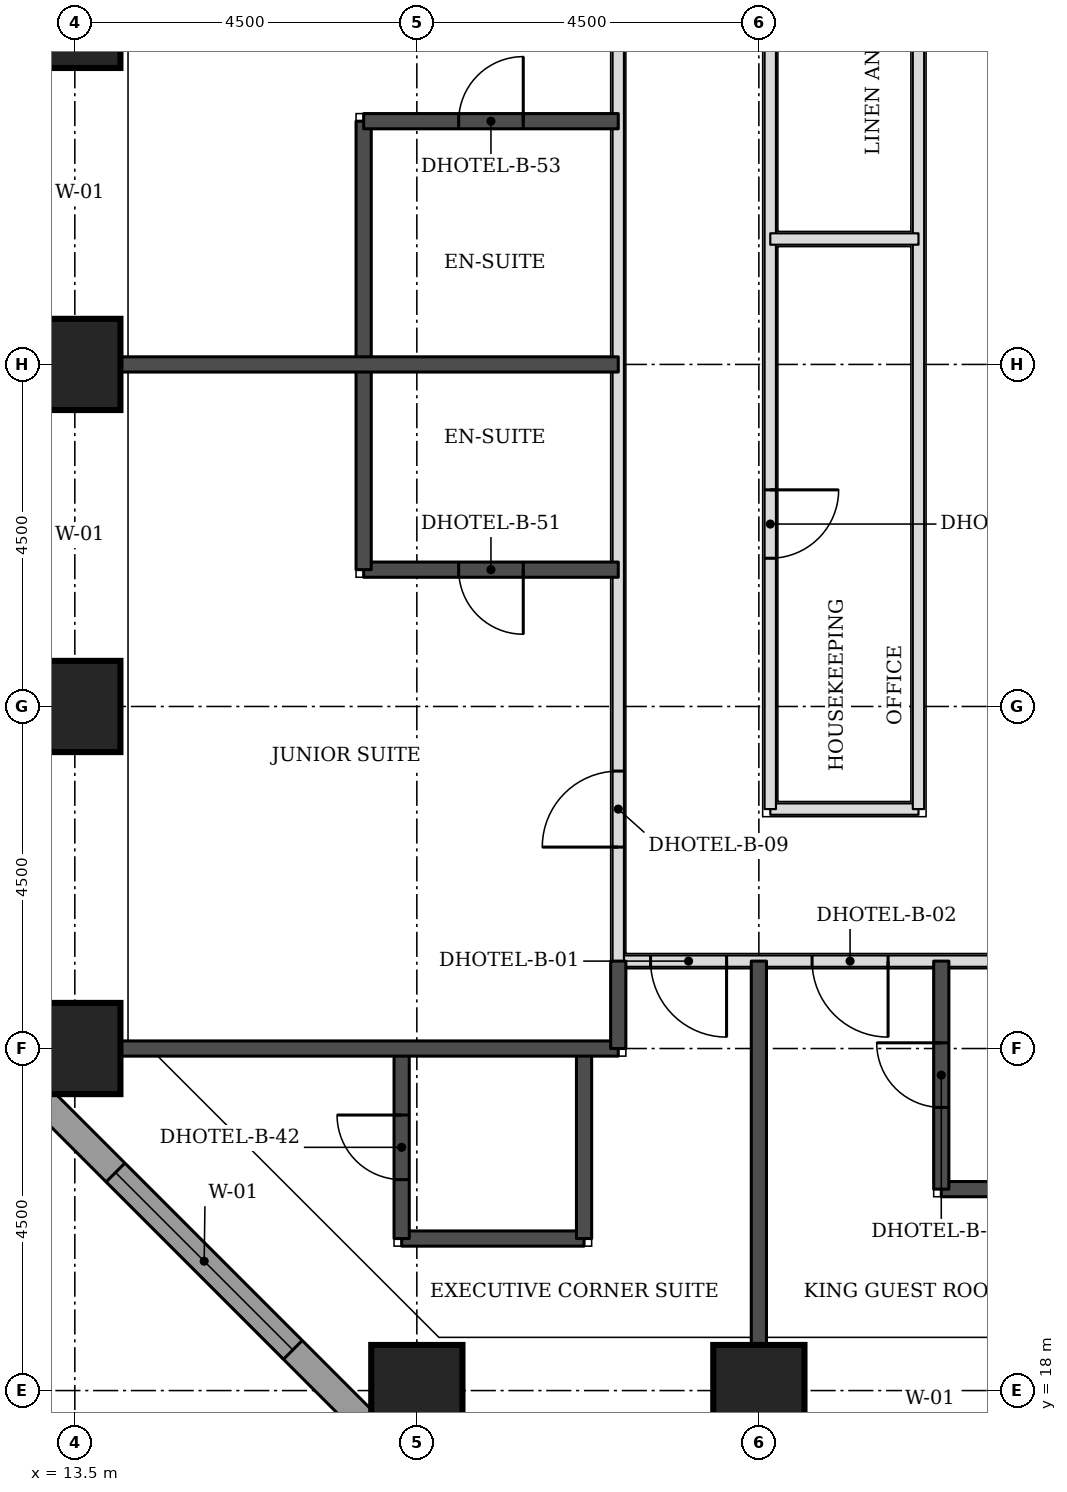
"""IFC4 building model, lengths in metres.
Left out: names, types, materials, properties, quantities, classifications, styles, units other than length and angle.
Written with IfcOpenShell. Run it as: python <this file> out.ifc"""

import sys

from ifc_helpers import new_model, si_unit, direction, frame, frame_2d, origin, origin_2d, place, context, subcontext, project, spatial, rectangle, extrude, element, fill, save


model = new_model("IFC4")
c1 = context("Model", 3, precision=1e-05, world=origin(), true_north=direction((0.0, 1.0)))
c2 = subcontext(c1, "Body", "Model", "MODEL_VIEW")
j1 = project(units=[si_unit("LENGTHUNIT", "METRE"), si_unit("PLANEANGLEUNIT", "RADIAN")], contexts=[c1])
p1 = place(None, origin())
s1 = spatial("IfcSite", under=j1, at=p1, CompositionType="ELEMENT")
p2 = place(p1, origin())
s2 = spatial("IfcBuilding", under=s1, at=p2, CompositionType="ELEMENT")
p3 = place(p2, frame((0.0, 0.0, 29.7)))
s3 = spatial("IfcBuildingStorey", under=s2, at=p3, CompositionType="ELEMENT", Elevation=29.7)
for number, where, z_axis, x_axis in (
    (1, (18.0, 18.0, 0.0), (0.0, 0.0, 1.0), (1.0, 0.0, 0.0)),
    (2, (22.5, 18.0, 0.0), (0.0, 0.0, 1.0), (1.0, 0.0, 0.0)),
    (3, (13.5, 22.5, 0.0), (0.0, 0.0, 1.0), (1.0, 0.0, 0.0)),
    (4, (13.5, 27.0, 0.0), (0.0, 0.0, 1.0), (1.0, 0.0, 0.0)),
    (5, (13.5, 31.5, 0.0), (0.0, 0.0, 1.0), (1.0, 0.0, 0.0)),
    (6, (13.5, 36.0, 0.0), (0.0, 0.0, 1.0), (1.0, 0.0, 0.0)),
):
    element("IfcColumn", number, at=place(p3, frame(where, z_axis=z_axis, x_axis=x_axis)), inside=s3, PredefinedType="COLUMN", context=c2, shape_type="SweptSolid", body=[
        extrude(rectangle(XDim=1.2, YDim=1.2, at=origin_2d()), origin(), (0.0, 0.0, 1.0), 3.3),
    ])
p4 = place(p3, frame((12.674, 22.23, 0.0), z_axis=(0.0, 0.0, 1.0), x_axis=(0.707106781187, -0.707106781187, 0.0)))
e7 = element("IfcWall", 7, at=p4, inside=s3, PredefinedType="STANDARD", context=c2, shape_type="SweptSolid", body=[
    extrude(rectangle(XDim=7.151, YDim=0.35, at=frame_2d((3.576, 0.0))), origin(), (0.0, 0.0, 1.0), 3.055),
])
p5 = place(p4, frame((1.926, 0.0, 0.8)))
e8 = element("IfcOpeningElement", 8, at=p5, cuts=e7, PredefinedType="OPENING", context=c2, shape_type="SweptSolid", body=[
    extrude(rectangle(XDim=3.3, YDim=1.5, at=frame_2d((1.65, 0.75))), frame((0.0, 0.185, 0.0), z_axis=(0.0, -1.0, 0.0), x_axis=(1.0, 0.0, 0.0)), (0.0, 0.0, 1.0), 0.37),
])
p6 = place(p3, frame((20.65, 23.65, 0.0), z_axis=(0.0, 0.0, 1.0), x_axis=(1.0, 0.0, 0.0)))
e9 = element("IfcWall", 9, at=p6, inside=s3, PredefinedType="PARTITIONING", context=c2, shape_type="SweptSolid", body=[
    extrude(rectangle(XDim=32.2, YDim=0.15, at=frame_2d((16.1, 0.0))), origin(), (0.0, 0.0, 1.0), 3.08),
])
p7 = place(p6, frame((2.55, 0.0, 0.0)))
e10 = element("IfcOpeningElement", 10, at=p7, cuts=e9, PredefinedType="OPENING", context=c2, shape_type="SweptSolid", body=[
    extrude(rectangle(XDim=1.0, YDim=2.1, at=frame_2d((0.5, 1.05))), frame((0.0, 0.085, 0.0), z_axis=(0.0, -1.0, 0.0), x_axis=(1.0, 0.0, 0.0)), (0.0, 0.0, 1.0), 0.17),
])
p8 = place(p6, frame((9.4, 0.0, 0.0)))
e11 = element("IfcOpeningElement", 11, at=p8, cuts=e9, PredefinedType="OPENING", context=c2, shape_type="SweptSolid", body=[
    extrude(rectangle(XDim=1.0, YDim=2.1, at=frame_2d((0.5, 1.05))), frame((0.0, 0.085, 0.0), z_axis=(0.0, -1.0, 0.0), x_axis=(1.0, 0.0, 0.0)), (0.0, 0.0, 1.0), 0.17),
])
p9 = place(p6, frame((11.55, 0.0, 0.0)))
e12 = element("IfcOpeningElement", 12, at=p9, cuts=e9, PredefinedType="OPENING", context=c2, shape_type="SweptSolid", body=[
    extrude(rectangle(XDim=1.0, YDim=2.1, at=frame_2d((0.5, 1.05))), frame((0.0, 0.085, 0.0), z_axis=(0.0, -1.0, 0.0), x_axis=(1.0, 0.0, 0.0)), (0.0, 0.0, 1.0), 0.17),
])
p10 = place(p6, frame((18.4, 0.0, 0.0)))
e13 = element("IfcOpeningElement", 13, at=p10, cuts=e9, PredefinedType="OPENING", context=c2, shape_type="SweptSolid", body=[
    extrude(rectangle(XDim=1.0, YDim=2.1, at=frame_2d((0.5, 1.05))), frame((0.0, 0.085, 0.0), z_axis=(0.0, -1.0, 0.0), x_axis=(1.0, 0.0, 0.0)), (0.0, 0.0, 1.0), 0.17),
])
p11 = place(p6, frame((20.55, 0.0, 0.0)))
e14 = element("IfcOpeningElement", 14, at=p11, cuts=e9, PredefinedType="OPENING", context=c2, shape_type="SweptSolid", body=[
    extrude(rectangle(XDim=1.0, YDim=2.1, at=frame_2d((0.5, 1.05))), frame((0.0, 0.085, 0.0), z_axis=(0.0, -1.0, 0.0), x_axis=(1.0, 0.0, 0.0)), (0.0, 0.0, 1.0), 0.17),
])
p12 = place(p6, frame((27.4, 0.0, 0.0)))
e15 = element("IfcOpeningElement", 15, at=p12, cuts=e9, PredefinedType="OPENING", context=c2, shape_type="SweptSolid", body=[
    extrude(rectangle(XDim=1.0, YDim=2.1, at=frame_2d((0.5, 1.05))), frame((0.0, 0.085, 0.0), z_axis=(0.0, -1.0, 0.0), x_axis=(1.0, 0.0, 0.0)), (0.0, 0.0, 1.0), 0.17),
])
p13 = place(p6, frame((0.425, 0.0, 0.0)))
e16 = element("IfcOpeningElement", 16, at=p13, cuts=e9, PredefinedType="OPENING", context=c2, shape_type="SweptSolid", body=[
    extrude(rectangle(XDim=1.0, YDim=2.1, at=frame_2d((0.5, 1.05))), frame((0.0, 0.085, 0.0), z_axis=(0.0, -1.0, 0.0), x_axis=(1.0, 0.0, 0.0)), (0.0, 0.0, 1.0), 0.17),
])
p14 = place(p6, frame((30.025, 0.0, 0.0)))
e17 = element("IfcOpeningElement", 17, at=p14, cuts=e9, PredefinedType="OPENING", context=c2, shape_type="SweptSolid", body=[
    extrude(rectangle(XDim=1.0, YDim=2.1, at=frame_2d((0.5, 1.05))), frame((0.0, 0.085, 0.0), z_axis=(0.0, -1.0, 0.0), x_axis=(1.0, 0.0, 0.0)), (0.0, 0.0, 1.0), 0.17),
])
p15 = place(p3, frame((20.65, 23.65, 0.0), z_axis=(0.0, 0.0, 1.0), x_axis=(0.0, 1.0, 0.0)))
e18 = element("IfcWall", 18, at=p15, inside=s3, PredefinedType="PARTITIONING", context=c2, shape_type="SweptSolid", body=[
    extrude(rectangle(XDim=25.85, YDim=0.15, at=frame_2d((12.925, 0.0))), origin(), (0.0, 0.0, 1.0), 3.08),
])
p16 = place(p15, frame((1.5, 0.0, 0.0)))
e19 = element("IfcOpeningElement", 19, at=p16, cuts=e18, PredefinedType="OPENING", context=c2, shape_type="SweptSolid", body=[
    extrude(rectangle(XDim=1.0, YDim=2.1, at=frame_2d((0.5, 1.05))), frame((0.0, 0.085, 0.0), z_axis=(0.0, -1.0, 0.0), x_axis=(1.0, 0.0, 0.0)), (0.0, 0.0, 1.0), 0.17),
])
p17 = place(p15, frame((13.45, 0.0, 0.0)))
e20 = element("IfcOpeningElement", 20, at=p17, cuts=e18, PredefinedType="OPENING", context=c2, shape_type="SweptSolid", body=[
    extrude(rectangle(XDim=1.0, YDim=2.1, at=frame_2d((0.5, 1.05))), frame((0.0, 0.085, 0.0), z_axis=(0.0, -1.0, 0.0), x_axis=(1.0, 0.0, 0.0)), (0.0, 0.0, 1.0), 0.17),
])
p18 = place(p15, frame((19.5, 0.0, 0.0)))
e21 = element("IfcOpeningElement", 21, at=p18, cuts=e18, PredefinedType="OPENING", context=c2, shape_type="SweptSolid", body=[
    extrude(rectangle(XDim=1.0, YDim=2.1, at=frame_2d((0.5, 1.05))), frame((0.0, 0.085, 0.0), z_axis=(0.0, -1.0, 0.0), x_axis=(1.0, 0.0, 0.0)), (0.0, 0.0, 1.0), 0.17),
])
p19 = place(p3, frame((22.65, 25.65, 0.0), z_axis=(0.0, 0.0, 1.0), x_axis=(1.0, 0.0, 0.0)))
e22 = element("IfcWall", 22, at=p19, inside=s3, PredefinedType="PARTITIONING", context=c2, shape_type="SweptSolid", body=[
    extrude(rectangle(XDim=1.95, YDim=0.15, at=frame_2d((0.975, 0.0))), origin(), (0.0, 0.0, 1.0), 3.08),
])
p20 = place(p3, frame((22.65, 25.65, 0.0), z_axis=(0.0, 0.0, 1.0), x_axis=(0.0, 1.0, 0.0)))
e23 = element("IfcWall", 23, at=p20, inside=s3, PredefinedType="PARTITIONING", context=c2, shape_type="SweptSolid", body=[
    extrude(rectangle(XDim=17.35, YDim=0.15, at=frame_2d((8.675, 0.0))), origin(), (0.0, 0.0, 1.0), 3.08),
])
p21 = place(p20, frame((3.3, 0.0, 0.0)))
e24 = element("IfcOpeningElement", 24, at=p21, cuts=e23, PredefinedType="OPENING", context=c2, shape_type="SweptSolid", body=[
    extrude(rectangle(XDim=0.9, YDim=2.1, at=frame_2d((0.45, 1.05))), frame((0.0, 0.085, 0.0), z_axis=(0.0, -1.0, 0.0), x_axis=(1.0, 0.0, 0.0)), (0.0, 0.0, 1.0), 0.17),
])
p22 = place(p20, frame((10.725, 0.0, 0.0)))
e25 = element("IfcOpeningElement", 25, at=p22, cuts=e23, PredefinedType="OPENING", context=c2, shape_type="SweptSolid", body=[
    extrude(rectangle(XDim=0.9, YDim=2.1, at=frame_2d((0.45, 1.05))), frame((0.0, 0.085, 0.0), z_axis=(0.0, -1.0, 0.0), x_axis=(1.0, 0.0, 0.0)), (0.0, 0.0, 1.0), 0.17),
])
p23 = place(p3, frame((24.6, 25.65, 0.0), z_axis=(0.0, 0.0, 1.0), x_axis=(0.0, 1.0, 0.0)))
e26 = element("IfcWall", 26, at=p23, inside=s3, PredefinedType="PARTITIONING", context=c2, shape_type="SweptSolid", body=[
    extrude(rectangle(XDim=14.85, YDim=0.15, at=frame_2d((7.425, 0.0))), origin(), (0.0, 0.0, 1.0), 3.08),
])
p24 = place(p3, frame((22.5, 18.6, 0.0), z_axis=(0.0, 0.0, 1.0), x_axis=(0.0, 1.0, 0.0)))
e27 = element("IfcWall", 27, at=p24, inside=s3, PredefinedType="SOLIDWALL", context=c2, shape_type="SweptSolid", body=[
    extrude(rectangle(XDim=5.05, YDim=0.2, at=frame_2d((2.525, 0.0))), origin(), (0.0, 0.0, 1.0), 3.08),
])
p25 = place(p3, frame((17.8, 20.0, 0.0), z_axis=(0.0, 0.0, 1.0), x_axis=(1.0, 0.0, 0.0)))
e28 = element("IfcWall", 28, at=p25, inside=s3, PredefinedType="SOLIDWALL", context=c2, shape_type="SweptSolid", body=[
    extrude(rectangle(XDim=2.4, YDim=0.2, at=frame_2d((1.2, 0.0))), origin(), (0.0, 0.0, 1.0), 3.08),
])
p26 = place(p3, frame((17.8, 20.0, 0.0), z_axis=(0.0, 0.0, 1.0), x_axis=(0.0, 1.0, 0.0)))
e29 = element("IfcWall", 29, at=p26, inside=s3, PredefinedType="SOLIDWALL", context=c2, shape_type="SweptSolid", body=[
    extrude(rectangle(XDim=2.5, YDim=0.2, at=frame_2d((1.25, 0.0))), origin(), (0.0, 0.0, 1.0), 3.08),
])
p27 = place(p26, frame((0.775, 0.0, 0.0)))
e30 = element("IfcOpeningElement", 30, at=p27, cuts=e29, PredefinedType="OPENING", context=c2, shape_type="SweptSolid", body=[
    extrude(rectangle(XDim=0.85, YDim=2.1, at=frame_2d((0.425, 1.05))), frame((0.0, 0.11, 0.0), z_axis=(0.0, -1.0, 0.0), x_axis=(1.0, 0.0, 0.0)), (0.0, 0.0, 1.0), 0.22),
])
p28 = place(p3, frame((20.2, 20.0, 0.0), z_axis=(0.0, 0.0, 1.0), x_axis=(0.0, 1.0, 0.0)))
e31 = element("IfcWall", 31, at=p28, inside=s3, PredefinedType="SOLIDWALL", context=c2, shape_type="SweptSolid", body=[
    extrude(rectangle(XDim=2.5, YDim=0.2, at=frame_2d((1.25, 0.0))), origin(), (0.0, 0.0, 1.0), 3.08),
])
p29 = place(p3, frame((24.9, 20.65, 0.0), z_axis=(0.0, 0.0, 1.0), x_axis=(1.0, 0.0, 0.0)))
e32 = element("IfcWall", 32, at=p29, inside=s3, PredefinedType="SOLIDWALL", context=c2, shape_type="SweptSolid", body=[
    extrude(rectangle(XDim=4.7, YDim=0.2, at=frame_2d((2.35, 0.0))), origin(), (0.0, 0.0, 1.0), 3.08),
])
p30 = place(p3, frame((24.9, 20.65, 0.0), z_axis=(0.0, 0.0, 1.0), x_axis=(0.0, 1.0, 0.0)))
e33 = element("IfcWall", 33, at=p30, inside=s3, PredefinedType="SOLIDWALL", context=c2, shape_type="SweptSolid", body=[
    extrude(rectangle(XDim=3.0, YDim=0.2, at=frame_2d((1.5, 0.0))), origin(), (0.0, 0.0, 1.0), 3.08),
])
p31 = place(p30, frame((1.075, 0.0, 0.0)))
e34 = element("IfcOpeningElement", 34, at=p31, cuts=e33, PredefinedType="OPENING", context=c2, shape_type="SweptSolid", body=[
    extrude(rectangle(XDim=0.85, YDim=2.1, at=frame_2d((0.425, 1.05))), frame((0.0, 0.11, 0.0), z_axis=(0.0, -1.0, 0.0), x_axis=(1.0, 0.0, 0.0)), (0.0, 0.0, 1.0), 0.22),
])
p32 = place(p3, frame((14.1, 22.5, 0.0), z_axis=(0.0, 0.0, 1.0), x_axis=(1.0, 0.0, 0.0)))
e35 = element("IfcWall", 35, at=p32, inside=s3, PredefinedType="SOLIDWALL", context=c2, shape_type="SweptSolid", body=[
    extrude(rectangle(XDim=6.55, YDim=0.2, at=frame_2d((3.275, 0.0))), origin(), (0.0, 0.0, 1.0), 3.08),
])
p33 = place(p3, frame((20.65, 22.5, 0.0), z_axis=(0.0, 0.0, 1.0), x_axis=(0.0, 1.0, 0.0)))
e36 = element("IfcWall", 36, at=p33, inside=s3, PredefinedType="SOLIDWALL", context=c2, shape_type="SweptSolid", body=[
    extrude(rectangle(XDim=1.15, YDim=0.2, at=frame_2d((0.575, 0.0))), origin(), (0.0, 0.0, 1.0), 3.08),
])
p34 = place(p3, frame((17.3, 28.8, 0.0), z_axis=(0.0, 0.0, 1.0), x_axis=(1.0, 0.0, 0.0)))
e37 = element("IfcWall", 37, at=p34, inside=s3, PredefinedType="SOLIDWALL", context=c2, shape_type="SweptSolid", body=[
    extrude(rectangle(XDim=3.35, YDim=0.2, at=frame_2d((1.675, 0.0))), origin(), (0.0, 0.0, 1.0), 3.08),
])
p35 = place(p34, frame((1.25, 0.0, 0.0)))
e38 = element("IfcOpeningElement", 38, at=p35, cuts=e37, PredefinedType="OPENING", context=c2, shape_type="SweptSolid", body=[
    extrude(rectangle(XDim=0.85, YDim=2.1, at=frame_2d((0.425, 1.05))), frame((0.0, 0.11, 0.0), z_axis=(0.0, -1.0, 0.0), x_axis=(1.0, 0.0, 0.0)), (0.0, 0.0, 1.0), 0.22),
])
p36 = place(p3, frame((17.3, 28.8, 0.0), z_axis=(0.0, 0.0, 1.0), x_axis=(0.0, 1.0, 0.0)))
e39 = element("IfcWall", 39, at=p36, inside=s3, PredefinedType="SOLIDWALL", context=c2, shape_type="SweptSolid", body=[
    extrude(rectangle(XDim=5.9, YDim=0.2, at=frame_2d((2.95, 0.0))), origin(), (0.0, 0.0, 1.0), 3.08),
])
p37 = place(p3, frame((14.1, 31.5, 0.0), z_axis=(0.0, 0.0, 1.0), x_axis=(1.0, 0.0, 0.0)))
e40 = element("IfcWall", 40, at=p37, inside=s3, PredefinedType="SOLIDWALL", context=c2, shape_type="SweptSolid", body=[
    extrude(rectangle(XDim=6.55, YDim=0.2, at=frame_2d((3.275, 0.0))), origin(), (0.0, 0.0, 1.0), 3.08),
])
p38 = place(p3, frame((17.3, 34.7, 0.0), z_axis=(0.0, 0.0, 1.0), x_axis=(1.0, 0.0, 0.0)))
e41 = element("IfcWall", 41, at=p38, inside=s3, PredefinedType="SOLIDWALL", context=c2, shape_type="SweptSolid", body=[
    extrude(rectangle(XDim=3.35, YDim=0.2, at=frame_2d((1.675, 0.0))), origin(), (0.0, 0.0, 1.0), 3.08),
])
p39 = place(p38, frame((1.25, 0.0, 0.0)))
e42 = element("IfcOpeningElement", 42, at=p39, cuts=e41, PredefinedType="OPENING", context=c2, shape_type="SweptSolid", body=[
    extrude(rectangle(XDim=0.85, YDim=2.1, at=frame_2d((0.425, 1.05))), frame((0.0, 0.11, 0.0), z_axis=(0.0, -1.0, 0.0), x_axis=(1.0, 0.0, 0.0)), (0.0, 0.0, 1.0), 0.22),
])
p40 = place(p3, frame((22.65, 33.15, 0.0), z_axis=(0.0, 0.0, 1.0), x_axis=(1.0, 0.0, 0.0)))
e43 = element("IfcWall", 43, at=p40, inside=s3, PredefinedType="PARTITIONING", context=c2, shape_type="SweptSolid", body=[
    extrude(rectangle(XDim=1.95, YDim=0.15, at=frame_2d((0.975, 0.0))), origin(), (0.0, 0.0, 1.0), 3.08),
])
p41 = place(p5, origin())
e44 = element("IfcWindow", 44, at=p41, inside=s3, PartitioningType="SINGLE_PANEL", PredefinedType="WINDOW", context=c2, shape_type="SweptSolid", body=[
    extrude(rectangle(XDim=3.3, YDim=1.5, at=frame_2d((1.65, 0.75))), frame((0.0, 0.085, 0.0), z_axis=(0.0, -1.0, 0.0), x_axis=(1.0, 0.0, 0.0)), (0.0, 0.0, 1.0), 0.06),
])
fill(e8, e44)
p42 = place(p7, frame((1.0, 0.0, 0.0), z_axis=(0.0, 0.0, 1.0), x_axis=(-1.0, 0.0, 0.0)))
e45 = element("IfcDoor", 45, at=p42, inside=s3, OperationType="SINGLE_SWING_LEFT", PredefinedType="DOOR", context=c2, shape_type="SweptSolid", body=[
    extrude(rectangle(XDim=1.0, YDim=2.1, at=frame_2d((0.5, 1.05))), frame((0.0, 0.025, 0.0), z_axis=(0.0, -1.0, 0.0), x_axis=(1.0, 0.0, 0.0)), (0.0, 0.0, 1.0), 0.05),
])
fill(e10, e45)
p43 = place(p31, origin())
e46 = element("IfcDoor", 46, at=p43, inside=s3, OperationType="SINGLE_SWING_RIGHT", PredefinedType="DOOR", context=c2, shape_type="SweptSolid", body=[
    extrude(rectangle(XDim=0.85, YDim=2.1, at=frame_2d((0.425, 1.05))), frame((0.0, 0.025, 0.0), z_axis=(0.0, -1.0, 0.0), x_axis=(1.0, 0.0, 0.0)), (0.0, 0.0, 1.0), 0.05),
])
fill(e34, e46)
p44 = place(p16, origin())
e47 = element("IfcDoor", 47, at=p44, inside=s3, OperationType="SINGLE_SWING_LEFT", PredefinedType="DOOR", context=c2, shape_type="SweptSolid", body=[
    extrude(rectangle(XDim=1.0, YDim=2.1, at=frame_2d((0.5, 1.05))), frame((0.0, 0.025, 0.0), z_axis=(0.0, -1.0, 0.0), x_axis=(1.0, 0.0, 0.0)), (0.0, 0.0, 1.0), 0.05),
])
fill(e19, e47)
p45 = place(p35, frame((0.85, 0.0, 0.0), z_axis=(0.0, 0.0, 1.0), x_axis=(-1.0, 0.0, 0.0)))
e48 = element("IfcDoor", 48, at=p45, inside=s3, OperationType="SINGLE_SWING_LEFT", PredefinedType="DOOR", context=c2, shape_type="SweptSolid", body=[
    extrude(rectangle(XDim=0.85, YDim=2.1, at=frame_2d((0.425, 1.05))), frame((0.0, 0.025, 0.0), z_axis=(0.0, -1.0, 0.0), x_axis=(1.0, 0.0, 0.0)), (0.0, 0.0, 1.0), 0.05),
])
fill(e38, e48)
p46 = place(p39, origin())
e49 = element("IfcDoor", 49, at=p46, inside=s3, OperationType="SINGLE_SWING_RIGHT", PredefinedType="DOOR", context=c2, shape_type="SweptSolid", body=[
    extrude(rectangle(XDim=0.85, YDim=2.1, at=frame_2d((0.425, 1.05))), frame((0.0, 0.025, 0.0), z_axis=(0.0, -1.0, 0.0), x_axis=(1.0, 0.0, 0.0)), (0.0, 0.0, 1.0), 0.05),
])
fill(e42, e49)
p47 = place(p13, frame((1.0, 0.0, 0.0), z_axis=(0.0, 0.0, 1.0), x_axis=(-1.0, 0.0, 0.0)))
e50 = element("IfcDoor", 50, at=p47, inside=s3, OperationType="SINGLE_SWING_LEFT", PredefinedType="DOOR", context=c2, shape_type="SweptSolid", body=[
    extrude(rectangle(XDim=1.0, YDim=2.1, at=frame_2d((0.5, 1.05))), frame((0.0, 0.025, 0.0), z_axis=(0.0, -1.0, 0.0), x_axis=(1.0, 0.0, 0.0)), (0.0, 0.0, 1.0), 0.05),
])
fill(e16, e50)
p48 = place(p27, origin())
e51 = element("IfcDoor", 51, at=p48, inside=s3, OperationType="SINGLE_SWING_RIGHT", PredefinedType="DOOR", context=c2, shape_type="SweptSolid", body=[
    extrude(rectangle(XDim=0.85, YDim=2.1, at=frame_2d((0.425, 1.05))), frame((0.0, 0.025, 0.0), z_axis=(0.0, -1.0, 0.0), x_axis=(1.0, 0.0, 0.0)), (0.0, 0.0, 1.0), 0.05),
])
fill(e30, e51)
p49 = place(p21, frame((0.9, 0.0, 0.0), z_axis=(0.0, 0.0, 1.0), x_axis=(-1.0, 0.0, 0.0)))
e52 = element("IfcDoor", 52, at=p49, inside=s3, OperationType="SINGLE_SWING_LEFT", PredefinedType="DOOR", context=c2, shape_type="SweptSolid", body=[
    extrude(rectangle(XDim=0.9, YDim=2.1, at=frame_2d((0.45, 1.05))), frame((0.0, 0.025, 0.0), z_axis=(0.0, -1.0, 0.0), x_axis=(1.0, 0.0, 0.0)), (0.0, 0.0, 1.0), 0.05),
])
fill(e24, e52)
save(model, sys.argv[1])
